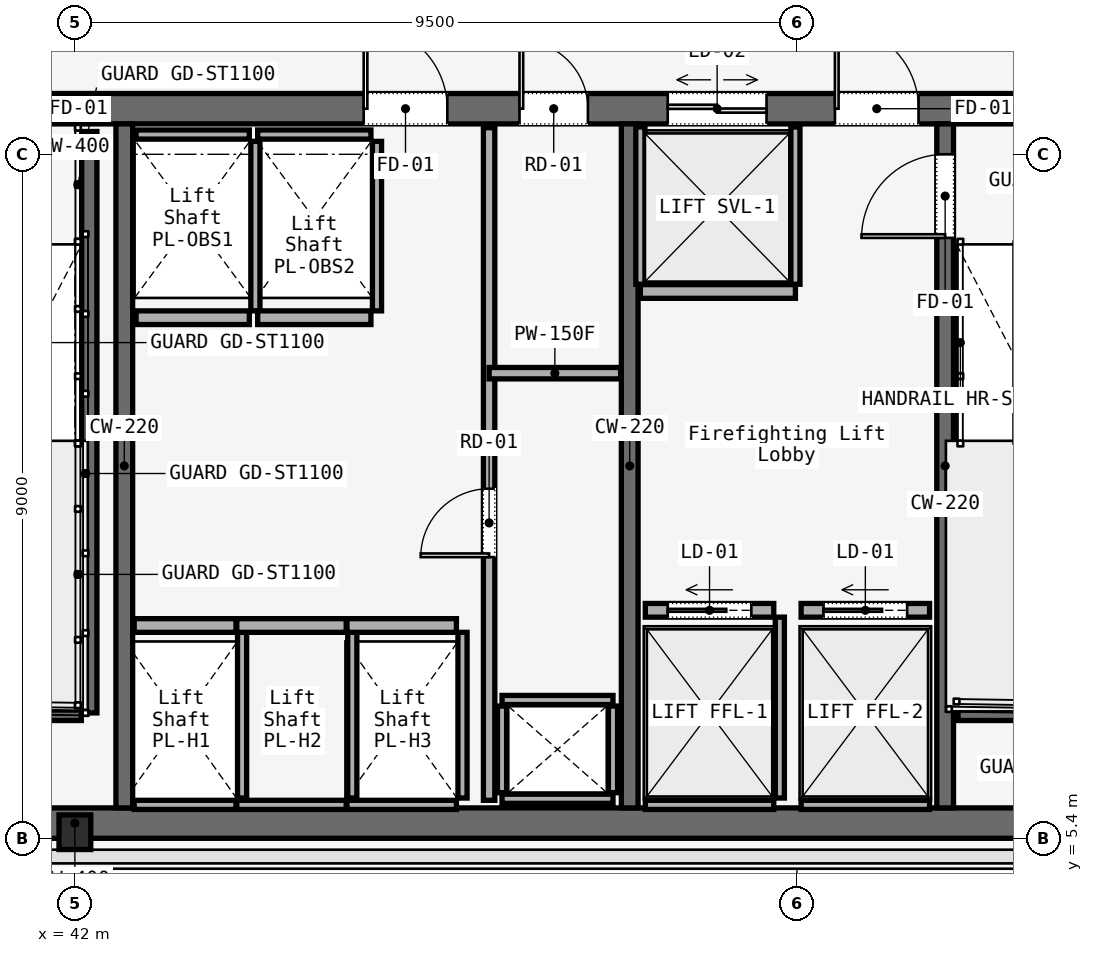
"""IFC4 building model, lengths in metres.
Left out: names, types, materials, properties, quantities, classifications, styles, units other than length and angle.
Written with IfcOpenShell. Run it as: python <this file> out.ifc"""

import sys

from ifc_helpers import new_model, si_unit, direction, frame, frame_2d, origin, origin_2d, place, context, subcontext, project, spatial, rectangle, i_section, extrude, element, fill, save


model = new_model("IFC4")
c1 = context("Model", 3, precision=1e-05, world=origin(), true_north=direction((0.0, 1.0)))
c2 = subcontext(c1, "Body", "Model", "MODEL_VIEW")
j1 = project(units=[si_unit("LENGTHUNIT", "METRE"), si_unit("PLANEANGLEUNIT", "RADIAN")], contexts=[c1])
p1 = place(None, origin())
s1 = spatial("IfcSite", under=j1, at=p1, CompositionType="ELEMENT")
p2 = place(p1, origin())
s2 = spatial("IfcBuilding", under=s1, at=p2, CompositionType="ELEMENT")
p3 = place(p2, frame((0.0, 0.0, 199.2)))
s3 = spatial("IfcBuildingStorey", under=s2, at=p3, CompositionType="ELEMENT", Elevation=199.2)
p4 = place(p3, frame((26.45, 15.0, 0.0), z_axis=(0.0, 0.0, 1.0), x_axis=(1.0, 0.0, 0.0)))
e1 = element("IfcWall", 1, at=p4, inside=s3, PredefinedType="SOLIDWALL", context=c2, shape_type="SweptSolid", body=[
    extrude(rectangle(XDim=31.1, YDim=0.4, at=frame_2d((15.55, 0.0))), origin(), (0.0, 0.0, 1.0), 3.52),
])
p5 = place(p4, frame((1.65, 0.0, 0.0)))
e2 = element("IfcOpeningElement", 2, at=p5, cuts=e1, PredefinedType="OPENING", context=c2, shape_type="SweptSolid", body=[
    extrude(rectangle(XDim=1.1, YDim=2.2, at=frame_2d((0.55, 1.1))), frame((0.0, 0.2, 0.0), z_axis=(0.0, -1.0, 0.0), x_axis=(1.0, 0.0, 0.0)), (0.0, 0.0, 1.0), 0.4),
])
p6 = place(p4, frame((13.65, 0.0, 0.0)))
e3 = element("IfcOpeningElement", 3, at=p6, cuts=e1, PredefinedType="OPENING", context=c2, shape_type="SweptSolid", body=[
    extrude(rectangle(XDim=1.1, YDim=2.2, at=frame_2d((0.55, 1.1))), frame((0.0, 0.2, 0.0), z_axis=(0.0, -1.0, 0.0), x_axis=(1.0, 0.0, 0.0)), (0.0, 0.0, 1.0), 0.4),
])
p7 = place(p4, frame((25.55, 0.0, 0.0)))
e4 = element("IfcOpeningElement", 4, at=p7, cuts=e1, PredefinedType="OPENING", context=c2, shape_type="SweptSolid", body=[
    extrude(rectangle(XDim=1.1, YDim=2.2, at=frame_2d((0.55, 1.1))), frame((0.0, 0.2, 0.0), z_axis=(0.0, -1.0, 0.0), x_axis=(1.0, 0.0, 0.0)), (0.0, 0.0, 1.0), 0.4),
])
p8 = place(p4, frame((10.7, 0.0, 0.0)))
e5 = element("IfcOpeningElement", 5, at=p8, cuts=e1, PredefinedType="OPENING", context=c2, shape_type="SweptSolid", body=[
    extrude(rectangle(XDim=1.4, YDim=2.2, at=frame_2d((0.7, 1.1))), frame((0.0, 0.2, 0.0), z_axis=(0.0, -1.0, 0.0), x_axis=(1.0, 0.0, 0.0)), (0.0, 0.0, 1.0), 0.4),
])
p9 = place(p4, frame((19.35, 0.0, 0.0)))
e6 = element("IfcOpeningElement", 6, at=p9, cuts=e1, PredefinedType="OPENING", context=c2, shape_type="SweptSolid", body=[
    extrude(rectangle(XDim=1.1, YDim=2.2, at=frame_2d((0.55, 1.1))), frame((0.0, 0.2, 0.0), z_axis=(0.0, -1.0, 0.0), x_axis=(1.0, 0.0, 0.0)), (0.0, 0.0, 1.0), 0.4),
])
p10 = place(p4, frame((21.4, 0.0, 0.0)))
e7 = element("IfcOpeningElement", 7, at=p10, cuts=e1, PredefinedType="OPENING", context=c2, shape_type="SweptSolid", body=[
    extrude(rectangle(XDim=0.9, YDim=2.1, at=frame_2d((0.45, 1.05))), frame((0.0, 0.2, 0.0), z_axis=(0.0, -1.0, 0.0), x_axis=(1.0, 0.0, 0.0)), (0.0, 0.0, 1.0), 0.4),
])
p11 = place(p4, frame((23.35, 0.0, 0.0)))
e8 = element("IfcOpeningElement", 8, at=p11, cuts=e1, PredefinedType="OPENING", context=c2, shape_type="SweptSolid", body=[
    extrude(rectangle(XDim=1.3, YDim=2.3, at=frame_2d((0.65, 1.15))), frame((0.0, 0.2, 0.0), z_axis=(0.0, -1.0, 0.0), x_axis=(1.0, 0.0, 0.0)), (0.0, 0.0, 1.0), 0.4),
])
p12 = place(p3, frame((26.45, 5.6, 0.0), z_axis=(0.0, 0.0, 1.0), x_axis=(1.0, 0.0, 0.0)))
e9 = element("IfcWall", 9, at=p12, inside=s3, PredefinedType="SOLIDWALL", context=c2, shape_type="SweptSolid", body=[
    extrude(rectangle(XDim=31.1, YDim=0.4, at=frame_2d((15.55, 0.0))), origin(), (0.0, 0.0, 1.0), 3.52),
])
for number, where, z_axis, x_axis in (
    (10, (42.65, 5.8, 0.0), (0.0, 0.0, 1.0), (0.0, 1.0, 0.0)),
    (11, (49.3, 5.8, 0.0), (0.0, 0.0, 1.0), (0.0, 1.0, 0.0)),
):
    element("IfcWall", number, at=place(p3, frame(where, z_axis=z_axis, x_axis=x_axis)), inside=s3, PredefinedType="SOLIDWALL", context=c2, shape_type="SweptSolid", body=[
        extrude(rectangle(XDim=9.0, YDim=0.22, at=frame_2d((4.5, 0.0))), origin(), (0.0, 0.0, 1.0), 3.52),
    ])
p13 = place(p3, frame((53.45, 5.8, 0.0), z_axis=(0.0, 0.0, 1.0), x_axis=(0.0, 1.0, 0.0)))
e12 = element("IfcWall", 12, at=p13, inside=s3, PredefinedType="SOLIDWALL", context=c2, shape_type="SweptSolid", body=[
    extrude(rectangle(XDim=9.0, YDim=0.22, at=frame_2d((4.5, 0.0))), origin(), (0.0, 0.0, 1.0), 3.52),
])
p14 = place(p13, frame((7.5, 0.0, 0.0)))
e13 = element("IfcOpeningElement", 13, at=p14, cuts=e12, PredefinedType="OPENING", context=c2, shape_type="SweptSolid", body=[
    extrude(rectangle(XDim=1.1, YDim=2.2, at=frame_2d((0.55, 1.1))), frame((0.0, 0.11, 0.0), z_axis=(0.0, -1.0, 0.0), x_axis=(1.0, 0.0, 0.0)), (0.0, 0.0, 1.0), 0.22),
])
p15 = place(p3, frame((42.0, 5.48, 0.0), z_axis=(0.0, 0.0, 1.0), x_axis=(1.0, 0.0, 0.0)))
e14 = element("IfcColumn", 14, at=p15, inside=s3, PredefinedType="COLUMN", context=c2, shape_type="SweptSolid", body=[
    extrude(i_section(OverallWidth=0.418, OverallDepth=0.455, WebThickness=0.042, FlangeThickness=0.052, FilletRadius=0.015, at=origin_2d()), origin(), (0.0, 0.0, 1.0), 3.52),
])
p16 = place(p3, frame((42.19, 14.7, 0.0), z_axis=(0.0, 0.0, 1.0), x_axis=(0.0, -1.0, 0.0)))
e15 = element("IfcWall", 15, at=p16, inside=s3, PredefinedType="SOLIDWALL", context=c2, shape_type="SweptSolid", body=[
    extrude(rectangle(XDim=7.65, YDim=0.2, at=frame_2d((3.825, 0.0))), origin(), (0.0, 0.0, 1.0), 3.8),
])
for number, where, z_axis, x_axis in (
    (16, (38.97, 7.05, 0.0), (0.0, 0.0, 1.0), (1.0, 0.0, 0.0)),
    (17, (53.62, 7.05, 0.0), (0.0, 0.0, 1.0), (1.0, 0.0, 0.0)),
):
    element("IfcWall", number, at=place(p3, frame(where, z_axis=z_axis, x_axis=x_axis)), inside=s3, PredefinedType="SOLIDWALL", context=c2, shape_type="SweptSolid", body=[
        extrude(rectangle(XDim=3.115, YDim=0.2, at=frame_2d((1.558, 0.0))), origin(), (0.0, 0.0, 1.0), 3.8),
    ])
for number, where, z_axis, x_axis in (
    (18, (47.62, 5.92, 0.0), (0.0, 0.0, 1.0), (1.0, 0.0, 0.0)),
    (19, (47.62, 7.22, 0.0), (0.0, 0.0, 1.0), (1.0, 0.0, 0.0)),
):
    element("IfcWall", number, at=place(p3, frame(where, z_axis=z_axis, x_axis=x_axis)), inside=s3, PredefinedType="SOLIDWALL", context=c2, shape_type="SweptSolid", body=[
        extrude(rectangle(XDim=1.46, YDim=0.12, at=frame_2d((0.73, 0.0))), origin(), (0.0, 0.0, 1.0), 2.95),
    ])
for number, where, z_axis, x_axis in (
    (20, (47.62, 6.0, 0.0), (0.0, 0.0, 1.0), (0.0, 1.0, 0.0)),
    (21, (49.08, 6.0, 0.0), (0.0, 0.0, 1.0), (0.0, 1.0, 0.0)),
):
    element("IfcWall", number, at=place(p3, frame(where, z_axis=z_axis, x_axis=x_axis)), inside=s3, PredefinedType="SOLIDWALL", context=c2, shape_type="SweptSolid", body=[
        extrude(rectangle(XDim=1.14, YDim=0.12, at=frame_2d((0.57, 0.0))), origin(), (0.0, 0.0, 1.0), 2.95),
    ])
p17 = place(p3, frame((47.45, 5.9, 0.0), z_axis=(0.0, 0.0, 1.0), x_axis=(0.0, 1.0, 0.0)))
e22 = element("IfcWall", 22, at=p17, inside=s3, PredefinedType="PARTITIONING", context=c2, shape_type="SweptSolid", body=[
    extrude(rectangle(XDim=8.85, YDim=0.15, at=frame_2d((4.425, 0.0))), origin(), (0.0, 0.0, 1.0), 2.95),
])
p18 = place(p17, frame((3.2, 0.0, 0.0)))
e23 = element("IfcOpeningElement", 23, at=p18, cuts=e22, PredefinedType="OPENING", context=c2, shape_type="SweptSolid", body=[
    extrude(rectangle(XDim=0.9, YDim=2.1, at=frame_2d((0.45, 1.05))), frame((0.0, 0.075, 0.0), z_axis=(0.0, -1.0, 0.0), x_axis=(1.0, 0.0, 0.0)), (0.0, 0.0, 1.0), 0.15),
])
p19 = place(p3, frame((47.45, 11.52, 0.0), z_axis=(0.0, 0.0, 1.0), x_axis=(1.0, 0.0, 0.0)))
e24 = element("IfcWall", 24, at=p19, inside=s3, PredefinedType="PARTITIONING", context=c2, shape_type="SweptSolid", body=[
    extrude(rectangle(XDim=1.73, YDim=0.15, at=frame_2d((0.865, 0.0))), origin(), (0.0, 0.0, 1.0), 2.95),
])
p20 = place(p3, frame((42.78, 8.2, 0.0), z_axis=(0.0, 0.0, 1.0), x_axis=(1.0, 0.0, 0.0)))
e25 = element("IfcWall", 25, at=p20, inside=s3, PredefinedType="SOLIDWALL", context=c2, shape_type="SweptSolid", body=[
    extrude(rectangle(XDim=1.34, YDim=0.18, at=frame_2d((0.67, 0.0))), origin(), (0.0, 0.0, 1.0), 2.95),
])
p21 = place(p3, frame((42.78, 5.84, 0.0), z_axis=(0.0, 0.0, 1.0), x_axis=(1.0, 0.0, 0.0)))
e26 = element("IfcWall", 26, at=p21, inside=s3, PredefinedType="SOLIDWALL", context=c2, shape_type="SweptSolid", body=[
    extrude(rectangle(XDim=1.34, YDim=0.12, at=frame_2d((0.67, 0.0))), origin(), (0.0, 0.0, 1.0), 2.95),
])
p22 = place(p3, frame((44.2, 5.93, 0.0), z_axis=(0.0, 0.0, 1.0), x_axis=(0.0, 1.0, 0.0)))
e27 = element("IfcWall", 27, at=p22, inside=s3, PredefinedType="SOLIDWALL", context=c2, shape_type="SweptSolid", body=[
    extrude(rectangle(XDim=2.18, YDim=0.12, at=frame_2d((1.09, 0.0))), origin(), (0.0, 0.0, 1.0), 2.95),
])
p23 = place(p3, frame((44.13, 8.2, 0.0), z_axis=(0.0, 0.0, 1.0), x_axis=(1.0, 0.0, 0.0)))
e28 = element("IfcWall", 28, at=p23, inside=s3, PredefinedType="SOLIDWALL", context=c2, shape_type="SweptSolid", body=[
    extrude(rectangle(XDim=1.44, YDim=0.18, at=frame_2d((0.72, 0.0))), origin(), (0.0, 0.0, 1.0), 2.95),
])
p24 = place(p3, frame((44.13, 5.84, 0.0), z_axis=(0.0, 0.0, 1.0), x_axis=(1.0, 0.0, 0.0)))
e29 = element("IfcWall", 29, at=p24, inside=s3, PredefinedType="SOLIDWALL", context=c2, shape_type="SweptSolid", body=[
    extrude(rectangle(XDim=1.44, YDim=0.12, at=frame_2d((0.72, 0.0))), origin(), (0.0, 0.0, 1.0), 2.95),
])
p25 = place(p3, frame((45.65, 5.93, 0.0), z_axis=(0.0, 0.0, 1.0), x_axis=(0.0, 1.0, 0.0)))
e30 = element("IfcWall", 30, at=p25, inside=s3, PredefinedType="SOLIDWALL", context=c2, shape_type="SweptSolid", body=[
    extrude(rectangle(XDim=2.18, YDim=0.12, at=frame_2d((1.09, 0.0))), origin(), (0.0, 0.0, 1.0), 2.95),
])
p26 = place(p3, frame((45.58, 8.2, 0.0), z_axis=(0.0, 0.0, 1.0), x_axis=(1.0, 0.0, 0.0)))
e31 = element("IfcWall", 31, at=p26, inside=s3, PredefinedType="SOLIDWALL", context=c2, shape_type="SweptSolid", body=[
    extrude(rectangle(XDim=1.44, YDim=0.18, at=frame_2d((0.72, 0.0))), origin(), (0.0, 0.0, 1.0), 2.95),
])
p27 = place(p3, frame((45.58, 5.84, 0.0), z_axis=(0.0, 0.0, 1.0), x_axis=(1.0, 0.0, 0.0)))
e32 = element("IfcWall", 32, at=p27, inside=s3, PredefinedType="SOLIDWALL", context=c2, shape_type="SweptSolid", body=[
    extrude(rectangle(XDim=1.44, YDim=0.12, at=frame_2d((0.72, 0.0))), origin(), (0.0, 0.0, 1.0), 2.95),
])
p28 = place(p3, frame((47.1, 5.93, 0.0), z_axis=(0.0, 0.0, 1.0), x_axis=(0.0, 1.0, 0.0)))
e33 = element("IfcWall", 33, at=p28, inside=s3, PredefinedType="SOLIDWALL", context=c2, shape_type="SweptSolid", body=[
    extrude(rectangle(XDim=2.18, YDim=0.12, at=frame_2d((1.09, 0.0))), origin(), (0.0, 0.0, 1.0), 2.95),
])
p29 = place(p3, frame((42.805, 12.25, 0.0), z_axis=(0.0, 0.0, 1.0), x_axis=(1.0, 0.0, 0.0)))
e34 = element("IfcWall", 34, at=p29, inside=s3, PredefinedType="SOLIDWALL", context=c2, shape_type="SweptSolid", body=[
    extrude(rectangle(XDim=1.49, YDim=0.18, at=frame_2d((0.745, 0.0))), origin(), (0.0, 0.0, 1.0), 2.95),
])
p30 = place(p3, frame((42.805, 14.66, 0.0), z_axis=(0.0, 0.0, 1.0), x_axis=(1.0, 0.0, 0.0)))
e35 = element("IfcWall", 35, at=p30, inside=s3, PredefinedType="SOLIDWALL", context=c2, shape_type="SweptSolid", body=[
    extrude(rectangle(XDim=1.49, YDim=0.12, at=frame_2d((0.745, 0.0))), origin(), (0.0, 0.0, 1.0), 2.95),
])
p31 = place(p3, frame((44.375, 12.34, 0.0), z_axis=(0.0, 0.0, 1.0), x_axis=(0.0, 1.0, 0.0)))
e36 = element("IfcWall", 36, at=p31, inside=s3, PredefinedType="SOLIDWALL", context=c2, shape_type="SweptSolid", body=[
    extrude(rectangle(XDim=2.23, YDim=0.12, at=frame_2d((1.115, 0.0))), origin(), (0.0, 0.0, 1.0), 2.95),
])
p32 = place(p3, frame((44.405, 12.25, 0.0), z_axis=(0.0, 0.0, 1.0), x_axis=(1.0, 0.0, 0.0)))
e37 = element("IfcWall", 37, at=p32, inside=s3, PredefinedType="SOLIDWALL", context=c2, shape_type="SweptSolid", body=[
    extrude(rectangle(XDim=1.49, YDim=0.18, at=frame_2d((0.745, 0.0))), origin(), (0.0, 0.0, 1.0), 2.95),
])
p33 = place(p3, frame((44.405, 14.66, 0.0), z_axis=(0.0, 0.0, 1.0), x_axis=(1.0, 0.0, 0.0)))
e38 = element("IfcWall", 38, at=p33, inside=s3, PredefinedType="SOLIDWALL", context=c2, shape_type="SweptSolid", body=[
    extrude(rectangle(XDim=1.49, YDim=0.12, at=frame_2d((0.745, 0.0))), origin(), (0.0, 0.0, 1.0), 2.95),
])
p34 = place(p3, frame((45.975, 12.34, 0.0), z_axis=(0.0, 0.0, 1.0), x_axis=(0.0, 1.0, 0.0)))
e39 = element("IfcWall", 39, at=p34, inside=s3, PredefinedType="SOLIDWALL", context=c2, shape_type="SweptSolid", body=[
    extrude(rectangle(XDim=2.23, YDim=0.12, at=frame_2d((1.115, 0.0))), origin(), (0.0, 0.0, 1.0), 2.95),
])
p35 = place(p3, frame((49.505, 8.4, 0.0), z_axis=(0.0, 0.0, 1.0), x_axis=(1.0, 0.0, 0.0)))
e40 = element("IfcWall", 40, at=p35, inside=s3, PredefinedType="SOLIDWALL", context=c2, shape_type="SweptSolid", body=[
    extrude(rectangle(XDim=1.69, YDim=0.18, at=frame_2d((0.845, 0.0))), origin(), (0.0, 0.0, 1.0), 2.95),
])
p36 = place(p35, frame((0.295, 0.0, 0.0)))
e41 = element("IfcOpeningElement", 41, at=p36, cuts=e40, PredefinedType="OPENING", context=c2, shape_type="SweptSolid", body=[
    extrude(rectangle(XDim=1.1, YDim=2.2, at=frame_2d((0.55, 1.1))), frame((0.0, 0.09, 0.0), z_axis=(0.0, -1.0, 0.0), x_axis=(1.0, 0.0, 0.0)), (0.0, 0.0, 1.0), 0.18),
])
p37 = place(p3, frame((49.505, 5.84, 0.0), z_axis=(0.0, 0.0, 1.0), x_axis=(1.0, 0.0, 0.0)))
e42 = element("IfcWall", 42, at=p37, inside=s3, PredefinedType="SOLIDWALL", context=c2, shape_type="SweptSolid", body=[
    extrude(rectangle(XDim=1.69, YDim=0.12, at=frame_2d((0.845, 0.0))), origin(), (0.0, 0.0, 1.0), 2.95),
])
p38 = place(p3, frame((51.275, 5.93, 0.0), z_axis=(0.0, 0.0, 1.0), x_axis=(0.0, 1.0, 0.0)))
e43 = element("IfcWall", 43, at=p38, inside=s3, PredefinedType="SOLIDWALL", context=c2, shape_type="SweptSolid", body=[
    extrude(rectangle(XDim=2.38, YDim=0.12, at=frame_2d((1.19, 0.0))), origin(), (0.0, 0.0, 1.0), 2.95),
])
p39 = place(p3, frame((51.555, 8.4, 0.0), z_axis=(0.0, 0.0, 1.0), x_axis=(1.0, 0.0, 0.0)))
e44 = element("IfcWall", 44, at=p39, inside=s3, PredefinedType="SOLIDWALL", context=c2, shape_type="SweptSolid", body=[
    extrude(rectangle(XDim=1.69, YDim=0.18, at=frame_2d((0.845, 0.0))), origin(), (0.0, 0.0, 1.0), 2.95),
])
p40 = place(p39, frame((0.295, 0.0, 0.0)))
e45 = element("IfcOpeningElement", 45, at=p40, cuts=e44, PredefinedType="OPENING", context=c2, shape_type="SweptSolid", body=[
    extrude(rectangle(XDim=1.1, YDim=2.2, at=frame_2d((0.55, 1.1))), frame((0.0, 0.09, 0.0), z_axis=(0.0, -1.0, 0.0), x_axis=(1.0, 0.0, 0.0)), (0.0, 0.0, 1.0), 0.18),
])
p41 = place(p3, frame((51.555, 5.84, 0.0), z_axis=(0.0, 0.0, 1.0), x_axis=(1.0, 0.0, 0.0)))
e46 = element("IfcWall", 46, at=p41, inside=s3, PredefinedType="SOLIDWALL", context=c2, shape_type="SweptSolid", body=[
    extrude(rectangle(XDim=1.69, YDim=0.12, at=frame_2d((0.845, 0.0))), origin(), (0.0, 0.0, 1.0), 2.95),
])
p42 = place(p3, frame((49.44, 12.595, 0.0), z_axis=(0.0, 0.0, 1.0), x_axis=(1.0, 0.0, 0.0)))
e47 = element("IfcWall", 47, at=p42, inside=s3, PredefinedType="SOLIDWALL", context=c2, shape_type="SweptSolid", body=[
    extrude(rectangle(XDim=2.04, YDim=0.18, at=frame_2d((1.02, 0.0))), origin(), (0.0, 0.0, 1.0), 2.95),
])
for number, where, z_axis, x_axis in (
    (48, (49.44, 12.69, 0.0), (0.0, 0.0, 1.0), (0.0, 1.0, 0.0)),
    (49, (51.48, 12.69, 0.0), (0.0, 0.0, 1.0), (0.0, 1.0, 0.0)),
):
    element("IfcWall", number, at=place(p3, frame(where, z_axis=z_axis, x_axis=x_axis)), inside=s3, PredefinedType="SOLIDWALL", context=c2, shape_type="SweptSolid", body=[
        extrude(rectangle(XDim=2.07, YDim=0.12, at=frame_2d((1.035, 0.0))), origin(), (0.0, 0.0, 1.0), 2.95),
    ])
p43 = place(p7, origin())
e50 = element("IfcDoor", 50, at=p43, inside=s3, OperationType="SINGLE_SWING_RIGHT", PredefinedType="DOOR", context=c2, shape_type="SweptSolid", body=[
    extrude(rectangle(XDim=1.1, YDim=2.2, at=frame_2d((0.55, 1.1))), frame((0.0, 0.025, 0.0), z_axis=(0.0, -1.0, 0.0), x_axis=(1.0, 0.0, 0.0)), (0.0, 0.0, 1.0), 0.05),
])
fill(e4, e50)
p44 = place(p9, origin())
e51 = element("IfcDoor", 51, at=p44, inside=s3, OperationType="SINGLE_SWING_LEFT", PredefinedType="DOOR", context=c2, shape_type="SweptSolid", body=[
    extrude(rectangle(XDim=1.1, YDim=2.2, at=frame_2d((0.55, 1.1))), frame((0.0, 0.025, 0.0), z_axis=(0.0, -1.0, 0.0), x_axis=(1.0, 0.0, 0.0)), (0.0, 0.0, 1.0), 0.05),
])
fill(e6, e51)
p45 = place(p10, origin())
e52 = element("IfcDoor", 52, at=p45, inside=s3, OperationType="SINGLE_SWING_LEFT", PredefinedType="DOOR", context=c2, shape_type="SweptSolid", body=[
    extrude(rectangle(XDim=0.9, YDim=2.1, at=frame_2d((0.45, 1.05))), frame((0.0, 0.025, 0.0), z_axis=(0.0, -1.0, 0.0), x_axis=(1.0, 0.0, 0.0)), (0.0, 0.0, 1.0), 0.05),
])
fill(e7, e52)
p46 = place(p14, origin())
e53 = element("IfcDoor", 53, at=p46, inside=s3, OperationType="SINGLE_SWING_LEFT", PredefinedType="DOOR", context=c2, shape_type="SweptSolid", body=[
    extrude(rectangle(XDim=1.1, YDim=2.2, at=frame_2d((0.55, 1.1))), frame((0.0, 0.025, 0.0), z_axis=(0.0, -1.0, 0.0), x_axis=(1.0, 0.0, 0.0)), (0.0, 0.0, 1.0), 0.05),
])
fill(e13, e53)
p47 = place(p18, origin())
e54 = element("IfcDoor", 54, at=p47, inside=s3, OperationType="SINGLE_SWING_LEFT", PredefinedType="DOOR", context=c2, shape_type="SweptSolid", body=[
    extrude(rectangle(XDim=0.9, YDim=2.1, at=frame_2d((0.45, 1.05))), frame((0.0, 0.025, 0.0), z_axis=(0.0, -1.0, 0.0), x_axis=(1.0, 0.0, 0.0)), (0.0, 0.0, 1.0), 0.05),
])
fill(e23, e54)
p48 = place(p36, origin())
e55 = element("IfcDoor", 55, at=p48, inside=s3, OperationType="SLIDING_TO_LEFT", PredefinedType="DOOR", context=c2, shape_type="SweptSolid", body=[
    extrude(rectangle(XDim=1.1, YDim=2.2, at=frame_2d((0.55, 1.1))), frame((0.0, 0.025, 0.0), z_axis=(0.0, -1.0, 0.0), x_axis=(1.0, 0.0, 0.0)), (0.0, 0.0, 1.0), 0.05),
])
fill(e41, e55)
p49 = place(p40, origin())
e56 = element("IfcDoor", 56, at=p49, inside=s3, OperationType="SLIDING_TO_LEFT", PredefinedType="DOOR", context=c2, shape_type="SweptSolid", body=[
    extrude(rectangle(XDim=1.1, YDim=2.2, at=frame_2d((0.55, 1.1))), frame((0.0, 0.025, 0.0), z_axis=(0.0, -1.0, 0.0), x_axis=(1.0, 0.0, 0.0)), (0.0, 0.0, 1.0), 0.05),
])
fill(e45, e56)
p50 = place(p11, origin())
e57 = element("IfcDoor", 57, at=p50, inside=s3, OperationType="DOUBLE_DOOR_SLIDING", PredefinedType="DOOR", context=c2, shape_type="SweptSolid", body=[
    extrude(rectangle(XDim=1.3, YDim=2.3, at=frame_2d((0.65, 1.15))), frame((0.0, 0.025, 0.0), z_axis=(0.0, -1.0, 0.0), x_axis=(1.0, 0.0, 0.0)), (0.0, 0.0, 1.0), 0.05),
])
fill(e8, e57)
save(model, sys.argv[1])
